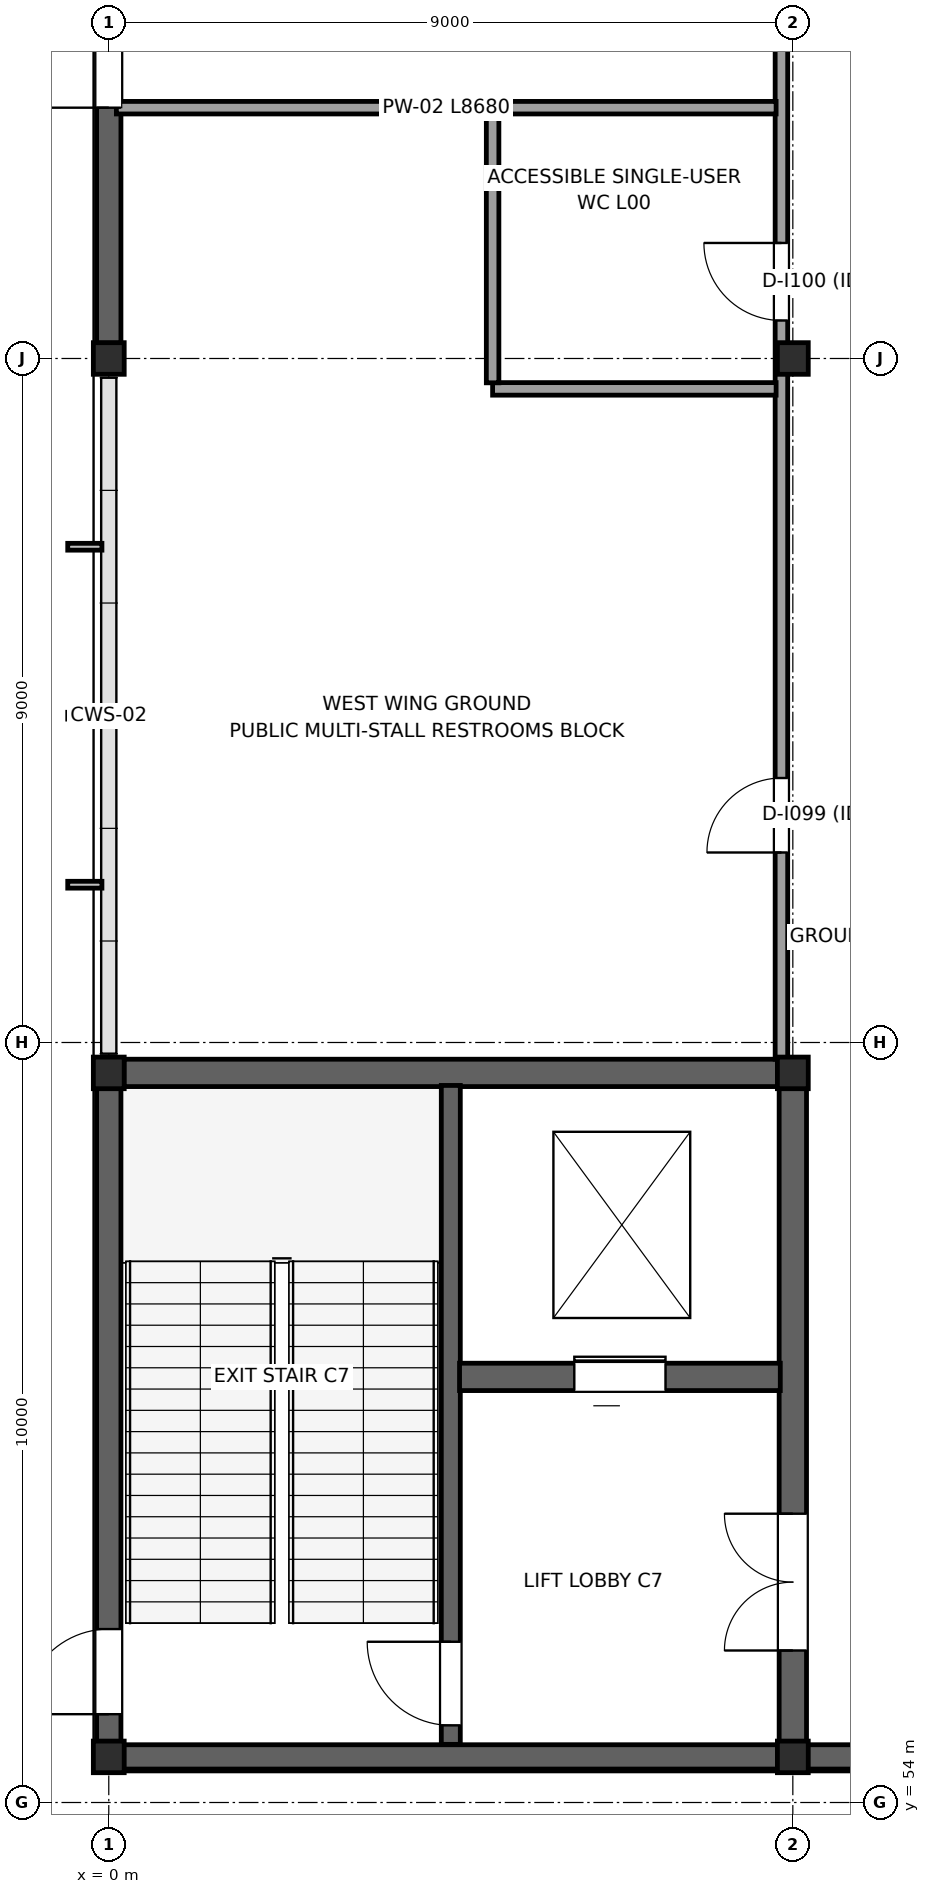
"""IFC4 building model, lengths in metres.
Left out: names, types, materials, properties, quantities, classifications, styles, units other than length and angle.
Written with IfcOpenShell. Run it as: python <this file> out.ifc"""

import sys

from ifc_helpers import new_model, si_unit, direction, frame, frame_2d, origin, origin_2d, place, context, subcontext, project, spatial, rectangle, i_section, extrude, element, fill, save


model = new_model("IFC4")
c1 = context("Model", 3, precision=1e-05, world=origin(), true_north=direction((0.0, 1.0)))
c2 = subcontext(c1, "Body", "Model", "MODEL_VIEW")
j1 = project(units=[si_unit("LENGTHUNIT", "METRE"), si_unit("PLANEANGLEUNIT", "RADIAN")], contexts=[c1])
p1 = place(None, origin())
s1 = spatial("IfcSite", under=j1, at=p1, CompositionType="ELEMENT")
p2 = place(p1, origin())
s2 = spatial("IfcBuilding", under=s1, at=p2, CompositionType="ELEMENT")
p3 = place(p2, origin())
s3 = spatial("IfcBuildingStorey", under=s2, at=p3, CompositionType="ELEMENT", Elevation=0.0)
for number, where, z_axis, x_axis in (
    (1, (0.0, 54.6, 0.0), (0.0, 0.0, 1.0), (1.0, 0.0, 0.0)),
    (2, (0.0, 63.6, 0.0), (0.0, 0.0, 1.0), (1.0, 0.0, 0.0)),
    (3, (0.0, 73.0, 0.0), (0.0, 0.0, 1.0), (1.0, 0.0, 0.0)),
    (4, (9.0, 54.6, 0.0), (0.0, 0.0, 1.0), (1.0, 0.0, 0.0)),
    (5, (9.0, 63.6, 0.0), (0.0, 0.0, 1.0), (1.0, 0.0, 0.0)),
    (6, (9.0, 73.0, 0.0), (0.0, 0.0, 1.0), (1.0, 0.0, 0.0)),
):
    element("IfcColumn", number, at=place(p3, frame(where, z_axis=z_axis, x_axis=x_axis)), inside=s3, PredefinedType="COLUMN", context=c2, shape_type="SweptSolid", body=[
        extrude(i_section(OverallWidth=0.406, OverallDepth=0.416, WebThickness=0.03, FlangeThickness=0.048, at=origin_2d()), origin(), (0.0, 0.0, 1.0), 6.0),
    ])
p4 = place(p3, frame((0.0, 54.802, 0.0), z_axis=(0.0, 0.0, 1.0), x_axis=(0.0, 1.0, 0.0)))
e7 = element("IfcWall", 7, at=p4, inside=s3, PredefinedType="STANDARD", context=c2, shape_type="SweptSolid", body=[
    extrude(rectangle(XDim=8.596, YDim=0.32, at=frame_2d((4.298, 0.0))), origin(), (0.0, 0.0, 1.0), 5.78),
])
p5 = place(p4, frame((0.36, 0.0, 0.0)))
e8 = element("IfcOpeningElement", 8, at=p5, cuts=e7, PredefinedType="OPENING", context=c2, shape_type="SweptSolid", body=[
    extrude(rectangle(XDim=1.12, YDim=2.24, at=frame_2d((0.56, 1.12))), frame((0.0, 0.17, 0.0), z_axis=(0.0, -1.0, 0.0), x_axis=(1.0, 0.0, 0.0)), (0.0, 0.0, 1.0), 0.34),
])
p6 = place(p3, frame((0.0, 73.202, 0.0), z_axis=(0.0, 0.0, 1.0), x_axis=(0.0, 1.0, 0.0)))
e9 = element("IfcWall", 9, at=p6, inside=s3, PredefinedType="STANDARD", context=c2, shape_type="SweptSolid", body=[
    extrude(rectangle(XDim=8.596, YDim=0.32, at=frame_2d((4.298, 0.0))), origin(), (0.0, 0.0, 1.0), 5.78),
])
p7 = place(p6, frame((3.098, 0.0, 0.0)))
e10 = element("IfcOpeningElement", 10, at=p7, cuts=e9, PredefinedType="OPENING", context=c2, shape_type="SweptSolid", body=[
    extrude(rectangle(XDim=2.4, YDim=2.6, at=frame_2d((1.2, 1.3))), frame((0.0, 0.17, 0.0), z_axis=(0.0, -1.0, 0.0), x_axis=(1.0, 0.0, 0.0)), (0.0, 0.0, 1.0), 0.34),
])
for number, where, z_axis, x_axis in (
    (11, (8.978, 54.6, 0.0), (0.0, 0.0, 1.0), (-1.0, 0.0, 0.0)),
    (12, (17.978, 54.6, 0.0), (0.0, 0.0, 1.0), (-1.0, 0.0, 0.0)),
):
    element("IfcWall", number, at=place(p3, frame(where, z_axis=z_axis, x_axis=x_axis)), inside=s3, PredefinedType="STANDARD", context=c2, shape_type="SweptSolid", body=[
        extrude(rectangle(XDim=8.956, YDim=0.32, at=frame_2d((4.478, 0.0))), origin(), (0.0, 0.0, 1.0), 5.78),
    ])
p8 = place(p3, frame((9.0, 54.803, 0.0), z_axis=(0.0, 0.0, 1.0), x_axis=(0.0, 1.0, 0.0)))
e13 = element("IfcWall", 13, at=p8, inside=s3, PredefinedType="SHEAR", context=c2, shape_type="SweptSolid", body=[
    extrude(rectangle(XDim=8.594, YDim=0.36, at=frame_2d((4.297, 0.0))), origin(), (0.0, 0.0, 1.0), 5.78),
])
p9 = place(p8, frame((1.197, 0.0, 0.0)))
e14 = element("IfcOpeningElement", 14, at=p9, cuts=e13, PredefinedType="OPENING", context=c2, shape_type="SweptSolid", body=[
    extrude(rectangle(XDim=1.8, YDim=2.3, at=frame_2d((0.9, 1.15))), frame((0.0, 0.19, 0.0), z_axis=(0.0, -1.0, 0.0), x_axis=(1.0, 0.0, 0.0)), (0.0, 0.0, 1.0), 0.38),
])
p10 = place(p3, frame((0.198, 63.6, 0.0), z_axis=(0.0, 0.0, 1.0), x_axis=(1.0, 0.0, 0.0)))
e15 = element("IfcWall", 15, at=p10, inside=s3, PredefinedType="SHEAR", context=c2, shape_type="SweptSolid", body=[
    extrude(rectangle(XDim=8.604, YDim=0.36, at=frame_2d((4.302, 0.0))), origin(), (0.0, 0.0, 1.0), 5.78),
])
p11 = place(p3, frame((4.5, 54.765, 0.0), z_axis=(0.0, 0.0, 1.0), x_axis=(0.0, 1.0, 0.0)))
e16 = element("IfcWall", 16, at=p11, inside=s3, PredefinedType="SHEAR", context=c2, shape_type="SweptSolid", body=[
    extrude(rectangle(XDim=8.67, YDim=0.25, at=frame_2d((4.335, 0.0))), origin(), (0.0, 0.0, 1.0), 5.78),
])
p12 = place(p11, frame((0.25, 0.0, 0.0)))
e17 = element("IfcOpeningElement", 17, at=p12, cuts=e16, PredefinedType="OPENING", context=c2, shape_type="SweptSolid", body=[
    extrude(rectangle(XDim=1.1, YDim=2.2, at=frame_2d((0.55, 1.1))), frame((0.0, 0.135, 0.0), z_axis=(0.0, -1.0, 0.0), x_axis=(1.0, 0.0, 0.0)), (0.0, 0.0, 1.0), 0.27),
])
p13 = place(p3, frame((4.615, 59.6, 0.0), z_axis=(0.0, 0.0, 1.0), x_axis=(1.0, 0.0, 0.0)))
e18 = element("IfcWall", 18, at=p13, inside=s3, PredefinedType="SHEAR", context=c2, shape_type="SweptSolid", body=[
    extrude(rectangle(XDim=4.22, YDim=0.36, at=frame_2d((2.11, 0.0))), origin(), (0.0, 0.0, 1.0), 5.78),
])
p14 = place(p13, frame((1.51, 0.0, 0.0)))
e19 = element("IfcOpeningElement", 19, at=p14, cuts=e18, PredefinedType="OPENING", context=c2, shape_type="SweptSolid", body=[
    extrude(rectangle(XDim=1.2, YDim=2.3, at=frame_2d((0.6, 1.15))), frame((0.0, 0.19, 0.0), z_axis=(0.0, -1.0, 0.0), x_axis=(1.0, 0.0, 0.0)), (0.0, 0.0, 1.0), 0.38),
])
p15 = place(p3, frame((8.85, 63.78, 0.0), z_axis=(0.0, 0.0, 1.0), x_axis=(0.0, 1.0, 0.0)))
e20 = element("IfcWall", 20, at=p15, inside=s3, PredefinedType="PARTITIONING", context=c2, shape_type="SweptSolid", body=[
    extrude(rectangle(XDim=27.04, YDim=0.165, at=frame_2d((13.52, 0.0))), origin(), (0.0, 0.0, 1.0), 4.65),
])
p16 = place(p15, frame((2.72, 0.0, 0.0)))
e21 = element("IfcOpeningElement", 21, at=p16, cuts=e20, PredefinedType="OPENING", context=c2, shape_type="SweptSolid", body=[
    extrude(rectangle(XDim=0.98, YDim=2.15, at=frame_2d((0.49, 1.075))), frame((0.0, 0.093, 0.0), z_axis=(0.0, -1.0, 0.0), x_axis=(1.0, 0.0, 0.0)), (0.0, 0.0, 1.0), 0.185),
])
p17 = place(p15, frame((9.72, 0.0, 0.0)))
e22 = element("IfcOpeningElement", 22, at=p17, cuts=e20, PredefinedType="OPENING", context=c2, shape_type="SweptSolid", body=[
    extrude(rectangle(XDim=1.02, YDim=2.16, at=frame_2d((0.51, 1.08))), frame((0.0, 0.093, 0.0), z_axis=(0.0, -1.0, 0.0), x_axis=(1.0, 0.0, 0.0)), (0.0, 0.0, 1.0), 0.185),
])
p18 = place(p15, frame((14.72, 0.0, 0.0)))
e23 = element("IfcOpeningElement", 23, at=p18, cuts=e20, PredefinedType="OPENING", context=c2, shape_type="SweptSolid", body=[
    extrude(rectangle(XDim=0.95, YDim=2.12, at=frame_2d((0.475, 1.06))), frame((0.0, 0.093, 0.0), z_axis=(0.0, -1.0, 0.0), x_axis=(1.0, 0.0, 0.0)), (0.0, 0.0, 1.0), 0.185),
])
p19 = place(p3, frame((5.05, 72.6, 0.0), z_axis=(0.0, 0.0, 1.0), x_axis=(1.0, 0.0, 0.0)))
e24 = element("IfcWall", 24, at=p19, inside=s3, PredefinedType="PARTITIONING", context=c2, shape_type="SweptSolid", body=[
    extrude(rectangle(XDim=3.73, YDim=0.165, at=frame_2d((1.865, 0.0))), origin(), (0.0, 0.0, 1.0), 4.65),
])
p20 = place(p3, frame((5.05, 72.68, 0.0), z_axis=(0.0, 0.0, 1.0), x_axis=(0.0, 1.0, 0.0)))
e25 = element("IfcWall", 25, at=p20, inside=s3, PredefinedType="PARTITIONING", context=c2, shape_type="SweptSolid", body=[
    extrude(rectangle(XDim=3.54, YDim=0.165, at=frame_2d((1.77, 0.0))), origin(), (0.0, 0.0, 1.0), 4.65),
])
p21 = place(p3, frame((0.1, 76.3, 0.0), z_axis=(0.0, 0.0, 1.0), x_axis=(1.0, 0.0, 0.0)))
e26 = element("IfcWall", 26, at=p21, inside=s3, PredefinedType="PARTITIONING", context=c2, shape_type="SweptSolid", body=[
    extrude(rectangle(XDim=8.68, YDim=0.165, at=frame_2d((4.34, 0.0))), origin(), (0.0, 0.0, 1.0), 4.65),
])
p22 = place(p5, origin())
e27 = element("IfcDoor", 27, at=p22, inside=s3, OperationType="SINGLE_SWING_LEFT", PredefinedType="DOOR", context=c2, shape_type="SweptSolid", body=[
    extrude(rectangle(XDim=1.12, YDim=2.24, at=frame_2d((0.56, 1.12))), frame((0.0, 0.025, 0.0), z_axis=(0.0, -1.0, 0.0), x_axis=(1.0, 0.0, 0.0)), (0.0, 0.0, 1.0), 0.05),
])
fill(e8, e27)
p23 = place(p7, origin())
e28 = element("IfcDoor", 28, at=p23, inside=s3, OperationType="DOUBLE_DOOR_SINGLE_SWING", PredefinedType="DOOR", context=c2, shape_type="SweptSolid", body=[
    extrude(rectangle(XDim=2.4, YDim=2.6, at=frame_2d((1.2, 1.3))), frame((0.0, 0.025, 0.0), z_axis=(0.0, -1.0, 0.0), x_axis=(1.0, 0.0, 0.0)), (0.0, 0.0, 1.0), 0.05),
])
fill(e10, e28)
p24 = place(p12, origin())
e29 = element("IfcDoor", 29, at=p24, inside=s3, OperationType="SINGLE_SWING_RIGHT", PredefinedType="DOOR", context=c2, shape_type="SweptSolid", body=[
    extrude(rectangle(XDim=1.1, YDim=2.2, at=frame_2d((0.55, 1.1))), frame((0.0, 0.025, 0.0), z_axis=(0.0, -1.0, 0.0), x_axis=(1.0, 0.0, 0.0)), (0.0, 0.0, 1.0), 0.05),
])
fill(e17, e29)
p25 = place(p14, origin())
e30 = element("IfcDoor", 30, at=p25, inside=s3, OperationType="SLIDING_TO_LEFT", PredefinedType="DOOR", context=c2, shape_type="SweptSolid", body=[
    extrude(rectangle(XDim=1.2, YDim=2.3, at=frame_2d((0.6, 1.15))), frame((0.0, 0.025, 0.0), z_axis=(0.0, -1.0, 0.0), x_axis=(1.0, 0.0, 0.0)), (0.0, 0.0, 1.0), 0.05),
])
fill(e19, e30)
p26 = place(p9, origin())
e31 = element("IfcDoor", 31, at=p26, inside=s3, OperationType="DOUBLE_DOOR_SINGLE_SWING", PredefinedType="DOOR", context=c2, shape_type="SweptSolid", body=[
    extrude(rectangle(XDim=1.8, YDim=2.3, at=frame_2d((0.9, 1.15))), frame((0.0, 0.025, 0.0), z_axis=(0.0, -1.0, 0.0), x_axis=(1.0, 0.0, 0.0)), (0.0, 0.0, 1.0), 0.05),
])
fill(e14, e31)
p27 = place(p16, origin())
e32 = element("IfcDoor", 32, at=p27, inside=s3, OperationType="SINGLE_SWING_LEFT", PredefinedType="DOOR", context=c2, shape_type="SweptSolid", body=[
    extrude(rectangle(XDim=0.98, YDim=2.15, at=frame_2d((0.49, 1.075))), frame((0.0, 0.025, 0.0), z_axis=(0.0, -1.0, 0.0), x_axis=(1.0, 0.0, 0.0)), (0.0, 0.0, 1.0), 0.05),
])
fill(e21, e32)
p28 = place(p17, origin())
e33 = element("IfcDoor", 33, at=p28, inside=s3, OperationType="SINGLE_SWING_RIGHT", PredefinedType="DOOR", context=c2, shape_type="SweptSolid", body=[
    extrude(rectangle(XDim=1.02, YDim=2.16, at=frame_2d((0.51, 1.08))), frame((0.0, 0.025, 0.0), z_axis=(0.0, -1.0, 0.0), x_axis=(1.0, 0.0, 0.0)), (0.0, 0.0, 1.0), 0.05),
])
fill(e22, e33)
save(model, sys.argv[1])
